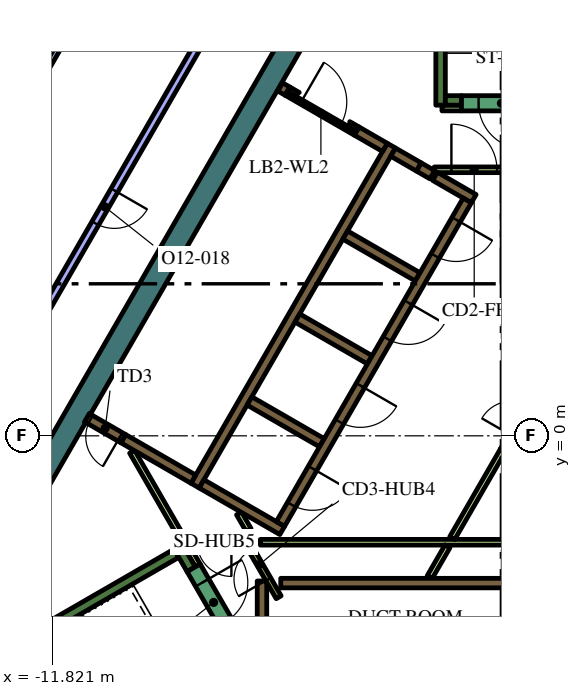
"""IFC4 building model, lengths in metres.
Left out: names, types, materials, properties, quantities, classifications, styles, units other than length and angle.
Written with IfcOpenShell. Run it as: python <this file> out.ifc"""

import sys

from ifc_helpers import new_model, si_unit, direction, frame, frame_2d, origin, place, context, subcontext, project, spatial, polyline, rectangle, outline, extrude, element, fill, save


model = new_model("IFC4")
c1 = context("Model", 3, precision=1e-05, world=origin(), true_north=direction((0.0, 1.0)))
c2 = subcontext(c1, "Body", "Model", "MODEL_VIEW")
j1 = project(units=[si_unit("LENGTHUNIT", "METRE"), si_unit("PLANEANGLEUNIT", "RADIAN")], contexts=[c1])
p1 = place(None, origin())
s1 = spatial("IfcSite", under=j1, at=p1, CompositionType="ELEMENT")
p2 = place(p1, origin())
s2 = spatial("IfcBuilding", under=s1, at=p2, CompositionType="ELEMENT")
p3 = place(p2, frame((0.0, 0.0, 283.8)))
s3 = spatial("IfcBuildingStorey", under=s2, at=p3, CompositionType="ELEMENT", Elevation=283.8)
p4 = place(p3, origin())
e1 = element("IfcWall", 1, at=p4, inside=s3, PredefinedType="SOLIDWALL", context=c2, shape_type="SweptSolid", body=[
    extrude(outline(polyline([(-15.502, -6.35), (-4.912, 11.992), (-4.393, 11.692), (-10.815, 0.569), (-10.84, 0.583), (-10.84, 0.583), (-10.84, 0.583), (-10.965, 0.367), (-10.965, 0.367), (-10.965, 0.367), (-10.94, 0.352), (-11.033, 0.191), (-14.809, -6.35), (-15.156, -6.95), (-15.502, -6.35)])), origin(), (0.0, 0.0, 1.0), 4.2),
])
p5 = place(p3, frame((-1.6, 8.7, 0.0), z_axis=(0.0, 0.0, 1.0), x_axis=(0.0, 1.0, 0.0)))
e2 = element("IfcWall", 2, at=p5, inside=s3, PredefinedType="SOLIDWALL", context=c2, shape_type="SweptSolid", body=[
    extrude(rectangle(XDim=7.05, YDim=0.25, at=frame_2d((3.525, 0.0))), origin(), (0.0, 0.0, 1.0), 4.2),
])
p6 = place(p3, frame((-1.475, 8.825, 0.0), z_axis=(0.0, 0.0, 1.0), x_axis=(1.0, 0.0, 0.0)))
e3 = element("IfcWall", 3, at=p6, inside=s3, PredefinedType="SOLIDWALL", context=c2, shape_type="SweptSolid", body=[
    extrude(rectangle(XDim=0.425, YDim=0.25, at=frame_2d((0.212, 0.0))), origin(), (0.0, 0.0, 1.0), 4.2),
])
p7 = place(p3, frame((-14.44, -6.49, 0.0), z_axis=(0.0, 0.0, 1.0), x_axis=(0.866022966069, 0.500004222222, 0.0)))
e4 = element("IfcWall", 4, at=p7, inside=s3, PredefinedType="SOLIDWALL", context=c2, shape_type="SweptSolid", body=[
    extrude(rectangle(XDim=6.8, YDim=0.25, at=frame_2d((3.4, 0.0))), origin(), (0.0, 0.0, 1.0), 4.2),
])
p8 = place(p3, frame((-8.163, -3.511, 0.0), z_axis=(0.0, 0.0, 1.0), x_axis=(-0.499994068514, 0.866028828302, 0.0)))
e5 = element("IfcWall", 5, at=p8, inside=s3, PredefinedType="SOLIDWALL", context=c2, shape_type="SweptSolid", body=[
    extrude(rectangle(XDim=0.674, YDim=0.25, at=frame_2d((0.337, 0.0))), origin(), (0.0, 0.0, 1.0), 4.2),
])
p9 = place(p3, frame((-5.806, -3.875, 0.0), z_axis=(0.0, 0.0, 1.0), x_axis=(1.0, 0.0, 0.0)))
e6 = element("IfcWall", 6, at=p9, inside=s3, PredefinedType="SOLIDWALL", context=c2, shape_type="SweptSolid", body=[
    extrude(rectangle(XDim=12.231, YDim=0.25, at=frame_2d((6.116, 0.0))), origin(), (0.0, 0.0, 1.0), 4.2),
])
p10 = place(p3, frame((-6.3, -9.05, 0.0), z_axis=(0.0, 0.0, 1.0), x_axis=(0.0, 1.0, 0.0)))
e7 = element("IfcWall", 7, at=p10, inside=s3, PredefinedType="SOLIDWALL", context=c2, shape_type="SweptSolid", body=[
    extrude(rectangle(XDim=5.23, YDim=0.25, at=frame_2d((2.615, 0.0))), origin(), (0.0, 0.0, 1.0), 4.2),
])
p11 = place(p3, frame((-8.06, -1.311, 0.0), z_axis=(0.0, 0.0, 1.0), x_axis=(0.50000273126, 0.866023826885, 0.0)))
e8 = element("IfcWall", 8, at=p11, inside=s3, PredefinedType="SOLIDWALL", context=c2, shape_type="SweptSolid", body=[
    extrude(rectangle(XDim=10.33, YDim=0.25, at=frame_2d((5.165, 0.0))), origin(), (0.0, 0.0, 1.0), 4.2),
])
p12 = place(p3, frame((-1.819, 6.87, 0.0), z_axis=(0.0, 0.0, 1.0), x_axis=(-0.866294599386, 0.499533449405, 0.0)))
e9 = element("IfcWall", 9, at=p12, inside=s3, PredefinedType="SOLIDWALL", context=c2, shape_type="SweptSolid", body=[
    extrude(rectangle(XDim=0.41, YDim=0.25, at=frame_2d((0.205, 0.0))), origin(), (0.0, 0.0, 1.0), 4.2),
])
p13 = place(p3, frame((-2.849, 7.465, 0.0), z_axis=(0.0, 0.0, 1.0), x_axis=(0.865955664968, -0.500120771724, 0.0)))
e10 = element("IfcWall", 10, at=p13, inside=s3, PredefinedType="SOLIDWALL", context=c2, shape_type="SweptSolid", body=[
    extrude(rectangle(XDim=0.778, YDim=0.25, at=frame_2d((0.389, 0.0))), origin(), (0.0, 0.0, 1.0), 4.2),
])
p14 = place(p3, frame((-0.728, 6.24, 0.0), z_axis=(0.0, 0.0, 1.0), x_axis=(-0.866002680491, 0.500039355833, 0.0)))
e11 = element("IfcWall", 11, at=p14, inside=s3, PredefinedType="SOLIDWALL", context=c2, shape_type="SweptSolid", body=[
    extrude(rectangle(XDim=1.178, YDim=0.25, at=frame_2d((0.589, 0.0))), origin(), (0.0, 0.0, 1.0), 4.2),
])
for number, where, z_axis, x_axis in (
    (12, (-2.204, 4.182, 0.0), (0.0, 0.0, 1.0), (-0.866, 0.5, 0.0)),
    (13, (-5.369, 3.1, 0.0), (0.0, 0.0, 1.0), (0.866, -0.5, 0.0)),
    (14, (-4.724, -0.182, 0.0), (0.0, 0.0, 1.0), (-0.866, 0.5, 0.0)),
):
    element("IfcWall", number, at=place(p3, frame(where, z_axis=z_axis, x_axis=x_axis)), inside=s3, PredefinedType="SOLIDWALL", context=c2, shape_type="SweptSolid", body=[
        extrude(rectangle(XDim=2.2, YDim=0.25, at=frame_2d((1.1, 0.0))), origin(), (0.0, 0.0, 1.0), 4.2),
    ])
p15 = place(p3, frame((-7.889, -1.265, 0.0), z_axis=(0.0, 0.0, 1.0), x_axis=(0.866057815567, -0.499943856944, 0.0)))
e15 = element("IfcWall", 15, at=p15, inside=s3, PredefinedType="SOLIDWALL", context=c2, shape_type="SweptSolid", body=[
    extrude(rectangle(XDim=2.45, YDim=0.25, at=frame_2d((1.225, 0.0))), origin(), (0.0, 0.0, 1.0), 4.2),
])
p16 = place(p3, frame((-9.95, -0.075, 0.0), z_axis=(0.0, 0.0, 1.0), x_axis=(0.865962177421, -0.500109495288, 0.0)))
e16 = element("IfcWall", 16, at=p16, inside=s3, PredefinedType="SOLIDWALL", context=c2, shape_type="SweptSolid", body=[
    extrude(rectangle(XDim=2.129, YDim=0.25, at=frame_2d((1.065, 0.0))), origin(), (0.0, 0.0, 1.0), 4.2),
])
p17 = place(p3, frame((-5.629, 9.07, 0.0), z_axis=(0.0, 0.0, 1.0), x_axis=(-0.866185586049, 0.49972245349, 0.0)))
e17 = element("IfcWall", 17, at=p17, inside=s3, PredefinedType="SOLIDWALL", context=c2, shape_type="SweptSolid", body=[
    extrude(rectangle(XDim=0.22, YDim=0.25, at=frame_2d((0.11, 0.0))), origin(), (0.0, 0.0, 1.0), 4.2),
])
p18 = place(p3, frame((-3.809, 8.019, 0.0), z_axis=(0.0, 0.0, 1.0), x_axis=(0.866010229787, -0.500026281214, 0.0)))
e18 = element("IfcWall", 18, at=p18, inside=s3, PredefinedType="SOLIDWALL", context=c2, shape_type="SweptSolid", body=[
    extrude(rectangle(XDim=0.858, YDim=0.25, at=frame_2d((0.429, 0.0))), origin(), (0.0, 0.0, 1.0), 4.2),
])
e19 = element("IfcWall", 19, at=p4, inside=s3, PredefinedType="SOLIDWALL", context=c2, shape_type="SweptSolid", body=[
    extrude(outline(polyline([(-3.748, 8.128), (-3.813, 8.015), (-4.027, 8.139), (-4.017, 8.156), (-4.008, 8.173), (-4.0, 8.192), (-3.995, 8.21), (-3.991, 8.23), (-3.99, 8.25), (-3.99, 8.268), (-3.748, 8.128)])), origin(), (0.0, 0.0, 1.0), 4.2),
])
e20 = element("IfcWall", 20, at=p4, inside=s3, PredefinedType="SOLIDWALL", context=c2, shape_type="SweptSolid", body=[
    extrude(outline(polyline([(-5.689, 8.96), (-5.69, 8.961), (-5.565, 9.177), (-5.319, 9.035), (-5.335, 9.026), (-5.351, 9.015), (-5.366, 9.002), (-5.379, 8.988), (-5.392, 8.972), (-5.402, 8.956), (-5.412, 8.939), (-5.629, 9.064), (-5.629, 9.064), (-5.689, 8.96)])), origin(), (0.0, 0.0, 1.0), 4.2),
])
p19 = place(p3, frame((-9.718, -0.417, 0.0), z_axis=(0.0, 0.0, 1.0), x_axis=(0.499966538646, -0.866044721844, 0.0)))
e21 = element("IfcWall", 21, at=p19, inside=s3, PredefinedType="PARTITIONING", context=c2, shape_type="SweptSolid", body=[
    extrude(rectangle(XDim=2.511, YDim=0.15, at=frame_2d((1.255, 0.0))), origin(), (0.0, 0.0, 1.0), 3.55),
])
p20 = place(p3, frame((1.438, -2.8, 0.0), z_axis=(0.0, 0.0, 1.0), x_axis=(-1.0, 0.0, 0.0)))
e22 = element("IfcWall", 22, at=p20, inside=s3, PredefinedType="PARTITIONING", context=c2, shape_type="SweptSolid", body=[
    extrude(rectangle(XDim=7.781, YDim=0.15, at=frame_2d((3.891, 0.0))), origin(), (0.0, 0.0, 1.0), 3.55),
])
p21 = place(p3, frame((-1.418, -2.907, 0.0), z_axis=(0.0, 0.0, 1.0), x_axis=(-0.499978056798, -0.866038072327, 0.0)))
e23 = element("IfcWall", 23, at=p21, inside=s3, PredefinedType="PARTITIONING", context=c2, shape_type="SweptSolid", body=[
    extrude(rectangle(XDim=0.937, YDim=0.15, at=frame_2d((0.469, 0.0))), origin(), (0.0, 0.0, 1.0), 3.55),
])
p22 = place(p3, frame((-1.295, -2.693, 0.0), z_axis=(0.0, 0.0, 1.0), x_axis=(0.500030943131, 0.866007538022, 0.0)))
e24 = element("IfcWall", 24, at=p22, inside=s3, PredefinedType="PARTITIONING", context=c2, shape_type="SweptSolid", body=[
    extrude(rectangle(XDim=2.672, YDim=0.15, at=frame_2d((1.336, 0.0))), origin(), (0.0, 0.0, 1.0), 3.55),
])
p23 = place(p3, frame((-6.653, -2.477, 0.0), z_axis=(0.0, 0.0, 1.0), x_axis=(-0.500002592159, 0.866023907196, 0.0)))
e25 = element("IfcWall", 25, at=p23, inside=s3, PredefinedType="PARTITIONING", context=c2, shape_type="SweptSolid", body=[
    extrude(rectangle(XDim=0.503, YDim=0.15, at=frame_2d((0.251, 0.0))), origin(), (0.0, 0.0, 1.0), 3.55),
])
p24 = place(p3, frame((-7.99, -3.412, 0.0), z_axis=(0.0, 0.0, 1.0), x_axis=(-0.499858525911, 0.866107068482, 0.0)))
e26 = element("IfcWall", 26, at=p24, inside=s3, PredefinedType="PARTITIONING", context=c2, shape_type="SweptSolid", body=[
    extrude(rectangle(XDim=0.466, YDim=0.15, at=frame_2d((0.233, 0.0))), origin(), (0.0, 0.0, 1.0), 3.55),
])
p25 = place(p3, frame((-1.564, 8.625, 0.0), z_axis=(0.0, 0.0, 1.0), x_axis=(1.0, 0.0, 0.0)))
e27 = element("IfcWall", 27, at=p25, inside=s3, PredefinedType="PARTITIONING", context=c2, shape_type="SweptSolid", body=[
    extrude(rectangle(XDim=0.514, YDim=0.15, at=frame_2d((0.257, 0.0))), origin(), (0.0, 0.0, 1.0), 3.55),
])
p26 = place(p3, frame((-0.898, 6.194, 0.0), z_axis=(0.0, 0.0, 1.0), x_axis=(-0.499996202215, -0.866027596426, 0.0)))
e28 = element("IfcWall", 28, at=p26, inside=s3, PredefinedType="SOLIDWALL", context=c2, shape_type="SweptSolid", body=[
    extrude(rectangle(XDim=9.83, YDim=0.25, at=frame_2d((4.915, 0.0))), origin(), (0.0, 0.0, 1.0), 4.2),
])
p27 = place(p26, frame((0.585, 0.0, 0.0)))
e29 = element("IfcOpeningElement", 29, at=p27, cuts=e28, PredefinedType="OPENING", context=c2, shape_type="SweptSolid", body=[
    extrude(rectangle(XDim=1.1, YDim=2.1, at=frame_2d((0.55, 1.05))), frame((0.0, 0.135, 0.0), z_axis=(0.0, -1.0, 0.0), x_axis=(1.0, 0.0, 0.0)), (0.0, 0.0, 1.0), 0.27),
])
p28 = place(p26, frame((3.105, 0.0, 0.0)))
e30 = element("IfcOpeningElement", 30, at=p28, cuts=e28, PredefinedType="OPENING", context=c2, shape_type="SweptSolid", body=[
    extrude(rectangle(XDim=1.1, YDim=2.1, at=frame_2d((0.55, 1.05))), frame((0.0, 0.135, 0.0), z_axis=(0.0, -1.0, 0.0), x_axis=(1.0, 0.0, 0.0)), (0.0, 0.0, 1.0), 0.27),
])
p29 = place(p26, frame((5.625, 0.0, 0.0)))
e31 = element("IfcOpeningElement", 31, at=p29, cuts=e28, PredefinedType="OPENING", context=c2, shape_type="SweptSolid", body=[
    extrude(rectangle(XDim=1.1, YDim=2.1, at=frame_2d((0.55, 1.05))), frame((0.0, 0.135, 0.0), z_axis=(0.0, -1.0, 0.0), x_axis=(1.0, 0.0, 0.0)), (0.0, 0.0, 1.0), 0.27),
])
p30 = place(p26, frame((8.145, 0.0, 0.0)))
e32 = element("IfcOpeningElement", 32, at=p30, cuts=e28, PredefinedType="OPENING", context=c2, shape_type="SweptSolid", body=[
    extrude(rectangle(XDim=1.1, YDim=2.1, at=frame_2d((0.55, 1.05))), frame((0.0, 0.135, 0.0), z_axis=(0.0, -1.0, 0.0), x_axis=(1.0, 0.0, 0.0)), (0.0, 0.0, 1.0), 0.27),
])
p31 = place(p3, frame((1.05, 8.75, 0.0), z_axis=(0.0, 0.0, 1.0), x_axis=(-1.0, 0.0, 0.0)))
e33 = element("IfcWall", 33, at=p31, inside=s3, PredefinedType="SOLIDWALL", context=c2, shape_type="SweptSolid", body=[
    extrude(rectangle(XDim=2.1, YDim=0.4, at=frame_2d((1.05, 0.0))), origin(), (0.0, 0.0, 1.0), 4.2),
])
p32 = place(p31, frame((0.45, 0.0, 0.0)))
e34 = element("IfcOpeningElement", 34, at=p32, cuts=e33, PredefinedType="OPENING", context=c2, shape_type="SweptSolid", body=[
    extrude(rectangle(XDim=1.2, YDim=2.1, at=frame_2d((0.6, 1.05))), frame((0.0, 0.21, 0.0), z_axis=(0.0, -1.0, 0.0), x_axis=(1.0, 0.0, 0.0)), (0.0, 0.0, 1.0), 0.42),
])
p33 = place(p3, frame((-8.098, -3.474, 0.0), z_axis=(0.0, 0.0, 1.0), x_axis=(0.49994051562, -0.866059744384, 0.0)))
e35 = element("IfcWall", 35, at=p33, inside=s3, PredefinedType="SOLIDWALL", context=c2, shape_type="SweptSolid", body=[
    extrude(rectangle(XDim=2.1, YDim=0.4, at=frame_2d((1.05, 0.0))), origin(), (0.0, 0.0, 1.0), 4.2),
])
p34 = place(p33, frame((0.45, 0.0, 0.0)))
e36 = element("IfcOpeningElement", 36, at=p34, cuts=e35, PredefinedType="OPENING", context=c2, shape_type="SweptSolid", body=[
    extrude(rectangle(XDim=1.2, YDim=2.1, at=frame_2d((0.6, 1.05))), frame((0.0, 0.21, 0.0), z_axis=(0.0, -1.0, 0.0), x_axis=(1.0, 0.0, 0.0)), (0.0, 0.0, 1.0), 0.42),
])
p35 = place(p3, frame((-1.765, 7.0, 0.0), z_axis=(0.0, 0.0, 1.0), x_axis=(1.0, 0.0, 0.0)))
e37 = element("IfcWall", 37, at=p35, inside=s3, PredefinedType="PARTITIONING", context=c2, shape_type="SweptSolid", body=[
    extrude(rectangle(XDim=2.1, YDim=0.15, at=frame_2d((1.05, 0.0))), origin(), (0.0, 0.0, 1.0), 3.55),
])
p36 = place(p35, frame((0.45, 0.0, 0.0)))
e38 = element("IfcOpeningElement", 38, at=p36, cuts=e37, PredefinedType="OPENING", context=c2, shape_type="SweptSolid", body=[
    extrude(rectangle(XDim=1.2, YDim=2.1, at=frame_2d((0.6, 1.05))), frame((0.0, 0.085, 0.0), z_axis=(0.0, -1.0, 0.0), x_axis=(1.0, 0.0, 0.0)), (0.0, 0.0, 1.0), 0.17),
])
p37 = place(p3, frame((-5.861, -4.248, 0.0), z_axis=(0.0, 0.0, 1.0), x_axis=(-0.500043646338, 0.866000203093, 0.0)))
e39 = element("IfcWall", 39, at=p37, inside=s3, PredefinedType="PARTITIONING", context=c2, shape_type="SweptSolid", body=[
    extrude(rectangle(XDim=1.93, YDim=0.15, at=frame_2d((0.965, 0.0))), origin(), (0.0, 0.0, 1.0), 4.2),
])
p38 = place(p37, frame((0.55, 0.0, 0.0)))
e40 = element("IfcOpeningElement", 40, at=p38, cuts=e39, PredefinedType="OPENING", context=c2, shape_type="SweptSolid", body=[
    extrude(rectangle(XDim=0.9, YDim=2.1, at=frame_2d((0.45, 1.05))), frame((0.0, 0.085, 0.0), z_axis=(0.0, -1.0, 0.0), x_axis=(1.0, 0.0, 0.0)), (0.0, 0.0, 1.0), 0.17),
])
p39 = place(p3, frame((-5.659, 9.012, 0.0), z_axis=(0.0, 0.0, 1.0), x_axis=(0.866009402589, -0.500027713859, 0.0)))
e41 = element("IfcWall", 41, at=p39, inside=s3, PredefinedType="PARTITIONING", context=c2, shape_type="SweptSolid", body=[
    extrude(rectangle(XDim=2.1, YDim=0.12, at=frame_2d((1.05, 0.0))), origin(), (0.0, 0.0, 1.0), 3.55),
])
p40 = place(p39, frame((0.45, 0.0, 0.0)))
e42 = element("IfcOpeningElement", 42, at=p40, cuts=e41, PredefinedType="OPENING", context=c2, shape_type="SweptSolid", body=[
    extrude(rectangle(XDim=1.2, YDim=2.1, at=frame_2d((0.6, 1.05))), frame((0.0, 0.07, 0.0), z_axis=(0.0, -1.0, 0.0), x_axis=(1.0, 0.0, 0.0)), (0.0, 0.0, 1.0), 0.14),
])
p41 = place(p3, frame((0.041, -0.379, 0.0), z_axis=(0.0, 0.0, 1.0), x_axis=(0.499961193289, 0.866047807691, 0.0)))
e43 = element("IfcWall", 43, at=p41, inside=s3, PredefinedType="PARTITIONING", context=c2, shape_type="SweptSolid", body=[
    extrude(rectangle(XDim=1.8, YDim=0.15, at=frame_2d((0.9, 0.0))), origin(), (0.0, 0.0, 1.0), 3.55),
])
p42 = place(p41, frame((0.45, 0.0, 0.0)))
e44 = element("IfcOpeningElement", 44, at=p42, cuts=e43, PredefinedType="OPENING", context=c2, shape_type="SweptSolid", body=[
    extrude(rectangle(XDim=0.9, YDim=2.1, at=frame_2d((0.45, 1.05))), frame((0.0, 0.085, 0.0), z_axis=(0.0, -1.0, 0.0), x_axis=(1.0, 0.0, 0.0)), (0.0, 0.0, 1.0), 0.17),
])
p43 = place(p3, frame((-6.655, -2.8, 0.0), z_axis=(0.0, 0.0, 1.0), x_axis=(-1.0, 0.0, 0.0)))
e45 = element("IfcWall", 45, at=p43, inside=s3, PredefinedType="PARTITIONING", context=c2, shape_type="SweptSolid", body=[
    extrude(rectangle(XDim=1.8, YDim=0.15, at=frame_2d((0.9, 0.0))), origin(), (0.0, 0.0, 1.0), 3.55),
])
p44 = place(p43, frame((0.45, 0.0, 0.0)))
e46 = element("IfcOpeningElement", 46, at=p44, cuts=e45, PredefinedType="OPENING", context=c2, shape_type="SweptSolid", body=[
    extrude(rectangle(XDim=0.9, YDim=2.1, at=frame_2d((0.45, 1.05))), frame((0.0, 0.085, 0.0), z_axis=(0.0, -1.0, 0.0), x_axis=(1.0, 0.0, 0.0)), (0.0, 0.0, 1.0), 0.17),
])
p45 = place(p3, frame((-9.95, -0.075, 0.0), z_axis=(0.0, 0.0, 1.0), x_axis=(-0.865952669392, 0.500125958508, 0.0)))
e47 = element("IfcWall", 47, at=p45, inside=s3, PredefinedType="SOLIDWALL", context=c2, shape_type="SweptSolid", body=[
    extrude(rectangle(XDim=1.1, YDim=0.25, at=frame_2d((0.55, 0.0))), origin(), (0.0, 0.0, 1.0), 4.2),
])
p46 = place(p45, frame((0.1, 0.0, 0.0)))
e48 = element("IfcOpeningElement", 48, at=p46, cuts=e47, PredefinedType="OPENING", context=c2, shape_type="SweptSolid", body=[
    extrude(rectangle(XDim=0.9, YDim=2.1, at=frame_2d((0.45, 1.05))), frame((0.0, 0.135, 0.0), z_axis=(0.0, -1.0, 0.0), x_axis=(1.0, 0.0, 0.0)), (0.0, 0.0, 1.0), 0.27),
])
p47 = place(p3, frame((-14.74, 4.887, 0.0), z_axis=(0.0, 0.0, 1.0), x_axis=(0.500007141444, 0.86602128063, 0.0)))
e49 = element("IfcWall", 49, at=p47, inside=s3, PredefinedType="PARTITIONING", context=c2, shape_type="SweptSolid", body=[
    extrude(rectangle(XDim=6.137, YDim=0.15, at=frame_2d((3.068, 0.0))), origin(), (0.0, 0.0, 1.0), 3.55),
])
p48 = place(p47, frame((2.637, 0.0, 0.0)))
e50 = element("IfcOpeningElement", 50, at=p48, cuts=e49, PredefinedType="OPENING", context=c2, shape_type="SweptSolid", body=[
    extrude(rectangle(XDim=0.9, YDim=2.1, at=frame_2d((0.45, 1.05))), frame((0.0, 0.085, 0.0), z_axis=(0.0, -1.0, 0.0), x_axis=(1.0, 0.0, 0.0)), (0.0, 0.0, 1.0), 0.17),
])
p49 = place(p3, frame((-7.436, 11.221, 0.0), z_axis=(0.0, 0.0, 1.0), x_axis=(-0.49999894854, -0.866026010844, 0.0)))
e51 = element("IfcWall", 51, at=p49, inside=s3, PredefinedType="PARTITIONING", context=c2, shape_type="SweptSolid", body=[
    extrude(rectangle(XDim=12.0, YDim=0.2, at=frame_2d((6.0, 0.0))), origin(), (0.0, 0.0, 1.0), 3.55),
])
p50 = place(p49, frame((5.5, 0.0, 0.0)))
e52 = element("IfcOpeningElement", 52, at=p50, cuts=e51, PredefinedType="OPENING", context=c2, shape_type="SweptSolid", body=[
    extrude(rectangle(XDim=1.0, YDim=2.1, at=frame_2d((0.5, 1.05))), frame((0.0, 0.11, 0.0), z_axis=(0.0, -1.0, 0.0), x_axis=(1.0, 0.0, 0.0)), (0.0, 0.0, 1.0), 0.22),
])
p51 = place(p27, origin())
e53 = element("IfcDoor", 53, at=p51, inside=s3, OperationType="DOUBLE_DOOR_SLIDING", PredefinedType="DOOR", context=c2, shape_type="SweptSolid", body=[
    extrude(rectangle(XDim=1.1, YDim=2.1, at=frame_2d((0.55, 1.05))), frame((0.0, 0.025, 0.0), z_axis=(0.0, -1.0, 0.0), x_axis=(1.0, 0.0, 0.0)), (0.0, 0.0, 1.0), 0.05),
])
fill(e29, e53)
p52 = place(p28, origin())
e54 = element("IfcDoor", 54, at=p52, inside=s3, OperationType="DOUBLE_DOOR_SLIDING", PredefinedType="DOOR", context=c2, shape_type="SweptSolid", body=[
    extrude(rectangle(XDim=1.1, YDim=2.1, at=frame_2d((0.55, 1.05))), frame((0.0, 0.025, 0.0), z_axis=(0.0, -1.0, 0.0), x_axis=(1.0, 0.0, 0.0)), (0.0, 0.0, 1.0), 0.05),
])
fill(e30, e54)
p53 = place(p29, origin())
e55 = element("IfcDoor", 55, at=p53, inside=s3, OperationType="DOUBLE_DOOR_SLIDING", PredefinedType="DOOR", context=c2, shape_type="SweptSolid", body=[
    extrude(rectangle(XDim=1.1, YDim=2.1, at=frame_2d((0.55, 1.05))), frame((0.0, 0.025, 0.0), z_axis=(0.0, -1.0, 0.0), x_axis=(1.0, 0.0, 0.0)), (0.0, 0.0, 1.0), 0.05),
])
fill(e31, e55)
p54 = place(p30, origin())
e56 = element("IfcDoor", 56, at=p54, inside=s3, OperationType="DOUBLE_DOOR_SLIDING", PredefinedType="DOOR", context=c2, shape_type="SweptSolid", body=[
    extrude(rectangle(XDim=1.1, YDim=2.1, at=frame_2d((0.55, 1.05))), frame((0.0, 0.025, 0.0), z_axis=(0.0, -1.0, 0.0), x_axis=(1.0, 0.0, 0.0)), (0.0, 0.0, 1.0), 0.05),
])
fill(e32, e56)
p55 = place(p32, origin())
e57 = element("IfcDoor", 57, at=p55, inside=s3, OperationType="SINGLE_SWING_LEFT", PredefinedType="DOOR", context=c2, shape_type="SweptSolid", body=[
    extrude(rectangle(XDim=1.2, YDim=2.1, at=frame_2d((0.6, 1.05))), frame((0.0, 0.025, 0.0), z_axis=(0.0, -1.0, 0.0), x_axis=(1.0, 0.0, 0.0)), (0.0, 0.0, 1.0), 0.05),
])
fill(e34, e57)
p56 = place(p34, origin())
e58 = element("IfcDoor", 58, at=p56, inside=s3, OperationType="SINGLE_SWING_LEFT", PredefinedType="DOOR", context=c2, shape_type="SweptSolid", body=[
    extrude(rectangle(XDim=1.2, YDim=2.1, at=frame_2d((0.6, 1.05))), frame((0.0, 0.025, 0.0), z_axis=(0.0, -1.0, 0.0), x_axis=(1.0, 0.0, 0.0)), (0.0, 0.0, 1.0), 0.05),
])
fill(e36, e58)
p57 = place(p36, origin())
e59 = element("IfcDoor", 59, at=p57, inside=s3, OperationType="SINGLE_SWING_LEFT", PredefinedType="DOOR", context=c2, shape_type="SweptSolid", body=[
    extrude(rectangle(XDim=1.2, YDim=2.1, at=frame_2d((0.6, 1.05))), frame((0.0, 0.025, 0.0), z_axis=(0.0, -1.0, 0.0), x_axis=(1.0, 0.0, 0.0)), (0.0, 0.0, 1.0), 0.05),
])
fill(e38, e59)
p58 = place(p38, origin())
e60 = element("IfcDoor", 60, at=p58, inside=s3, OperationType="SINGLE_SWING_LEFT", PredefinedType="DOOR", context=c2, shape_type="SweptSolid", body=[
    extrude(rectangle(XDim=0.9, YDim=2.1, at=frame_2d((0.45, 1.05))), frame((0.0, 0.025, 0.0), z_axis=(0.0, -1.0, 0.0), x_axis=(1.0, 0.0, 0.0)), (0.0, 0.0, 1.0), 0.05),
])
fill(e40, e60)
p59 = place(p40, origin())
e61 = element("IfcDoor", 61, at=p59, inside=s3, OperationType="SINGLE_SWING_LEFT", PredefinedType="DOOR", context=c2, shape_type="SweptSolid", body=[
    extrude(rectangle(XDim=1.2, YDim=2.1, at=frame_2d((0.6, 1.05))), frame((0.0, 0.025, 0.0), z_axis=(0.0, -1.0, 0.0), x_axis=(1.0, 0.0, 0.0)), (0.0, 0.0, 1.0), 0.05),
])
fill(e42, e61)
p60 = place(p44, origin())
e62 = element("IfcDoor", 62, at=p60, inside=s3, OperationType="SINGLE_SWING_LEFT", PredefinedType="DOOR", context=c2, shape_type="SweptSolid", body=[
    extrude(rectangle(XDim=0.9, YDim=2.1, at=frame_2d((0.45, 1.05))), frame((0.0, 0.025, 0.0), z_axis=(0.0, -1.0, 0.0), x_axis=(1.0, 0.0, 0.0)), (0.0, 0.0, 1.0), 0.05),
])
fill(e46, e62)
p61 = place(p46, origin())
e63 = element("IfcDoor", 63, at=p61, inside=s3, OperationType="SINGLE_SWING_LEFT", PredefinedType="DOOR", context=c2, shape_type="SweptSolid", body=[
    extrude(rectangle(XDim=0.9, YDim=2.1, at=frame_2d((0.45, 1.05))), frame((0.0, 0.025, 0.0), z_axis=(0.0, -1.0, 0.0), x_axis=(1.0, 0.0, 0.0)), (0.0, 0.0, 1.0), 0.05),
])
fill(e48, e63)
p62 = place(p50, origin())
e64 = element("IfcDoor", 64, at=p62, inside=s3, OperationType="SINGLE_SWING_RIGHT", PredefinedType="DOOR", context=c2, shape_type="SweptSolid", body=[
    extrude(rectangle(XDim=1.0, YDim=2.1, at=frame_2d((0.5, 1.05))), frame((0.0, 0.025, 0.0), z_axis=(0.0, -1.0, 0.0), x_axis=(1.0, 0.0, 0.0)), (0.0, 0.0, 1.0), 0.05),
])
fill(e52, e64)
save(model, sys.argv[1])
